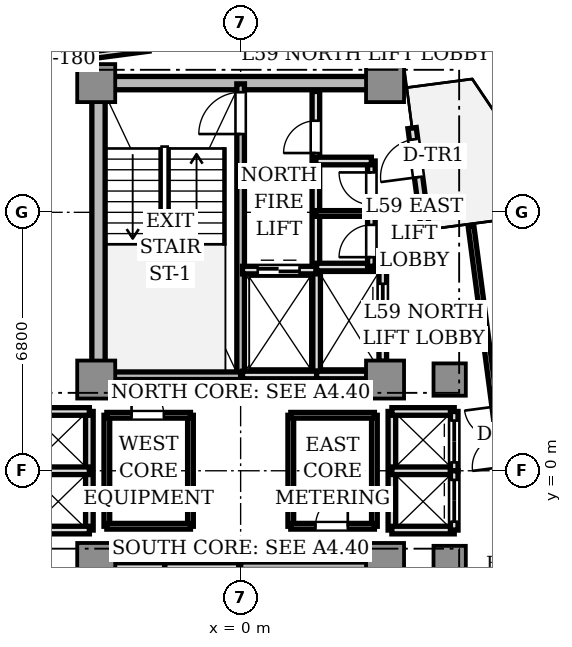
"""IFC4 building model, lengths in metres.
Left out: names, types, materials, properties, quantities, classifications, styles, units other than length and angle.
Written with IfcOpenShell. Run it as: python <this file> out.ifc"""

import sys

from ifc_helpers import new_model, si_unit, direction, frame, frame_2d, origin, origin_2d, place, context, subcontext, project, spatial, rectangle, extrude, source, transform, mapped, element, fill, save


model = new_model("IFC4")
c1 = context("Model", 3, precision=1e-05, world=origin(), true_north=direction((0.0, 1.0)))
c2 = subcontext(c1, "Body", "Model", "MODEL_VIEW")
j1 = project(units=[si_unit("LENGTHUNIT", "METRE"), si_unit("PLANEANGLEUNIT", "RADIAN")], contexts=[c1])
p1 = place(None, origin())
s1 = spatial("IfcSite", under=j1, at=p1, CompositionType="ELEMENT")
p2 = place(p1, origin())
s2 = spatial("IfcBuilding", under=s1, at=p2, CompositionType="ELEMENT")
p3 = place(p2, frame((0.0, 0.0, 213.2)))
s3 = spatial("IfcBuildingStorey", under=s2, at=p3, CompositionType="ELEMENT", Elevation=213.2)
p4 = place(p3, frame((-3.55, 10.2, 0.0), z_axis=(0.0, 0.0, 1.0), x_axis=(1.0, 0.0, 0.0)))
e1 = element("IfcWall", 1, at=p4, inside=s3, PredefinedType="SHEAR", context=c2, shape_type="SweptSolid", body=[
    extrude(rectangle(XDim=7.1, YDim=0.35, at=frame_2d((3.55, 0.0))), origin(), (0.0, 0.0, 1.0), 3.11),
])
p5 = place(p3, frame((-3.74, 2.85, 0.0), z_axis=(0.0, 0.0, 1.0), x_axis=(0.0, 1.0, 0.0)))
e2 = element("IfcWall", 2, at=p5, inside=s3, PredefinedType="SHEAR", context=c2, shape_type="SweptSolid", body=[
    extrude(rectangle(XDim=6.9, YDim=0.35, at=frame_2d((3.45, 0.0))), origin(), (0.0, 0.0, 1.0), 3.11),
])
m1 = source(origin(), c2, "Body", "SweptSolid", [
    extrude(rectangle(XDim=1.0, YDim=1.0, at=origin_2d()), origin(), (0.0, 0.0, 1.0), 3.11),
])
for number, where, z_axis, x_axis in (
    (3, (-3.8, 2.4, 0.0), (0.0, 0.0, 1.0), (1.0, 0.0, 0.0)),
    (4, (3.8, 2.4, 0.0), (0.0, 0.0, 1.0), (1.0, 0.0, 0.0)),
    (5, (-3.8, 10.2, 0.0), (0.0, 0.0, 1.0), (1.0, 0.0, 0.0)),
    (6, (3.8, 10.2, 0.0), (0.0, 0.0, 1.0), (1.0, 0.0, 0.0)),
    (7, (-3.8, -2.4, 0.0), (0.0, 0.0, 1.0), (1.0, 0.0, 0.0)),
    (8, (3.8, -2.4, 0.0), (0.0, 0.0, 1.0), (1.0, 0.0, 0.0)),
):
    element("IfcColumn", number, at=place(p3, frame(where, z_axis=z_axis, x_axis=x_axis)), inside=s3, PredefinedType="COLUMN", context=c2, shape_type="MappedRepresentation", body=[
        mapped(m1, transform((0.0, 0.0, 0.0), scale=1.0)),
    ])
m2 = source(origin(), c2, "Body", "SweptSolid", [
    extrude(rectangle(XDim=0.85, YDim=0.85, at=origin_2d()), origin(), (0.0, 0.0, 1.0), 3.11),
])
for number, where, z_axis, x_axis in (
    (9, (5.5, 2.4, 0.0), (0.0, 0.0, 1.0), (1.0, 0.0, 0.0)),
    (10, (5.5, -2.4, 0.0), (0.0, 0.0, 1.0), (1.0, 0.0, 0.0)),
):
    element("IfcColumn", number, at=place(p3, frame(where, z_axis=z_axis, x_axis=x_axis)), inside=s3, PredefinedType="COLUMN", context=c2, shape_type="MappedRepresentation", body=[
        mapped(m2, transform((0.0, 0.0, 0.0), scale=1.0)),
    ])
p6 = place(p3, frame((4.864, 6.339, 0.0), z_axis=(0.0, 0.0, 1.0), x_axis=(-0.130564442062, 0.991439824936, 0.0)))
e11 = element("IfcWall", 11, at=p6, inside=s3, PredefinedType="STANDARD", context=c2, shape_type="SweptSolid", body=[
    extrude(rectangle(XDim=2.7, YDim=0.22, at=frame_2d((1.35, 0.0))), origin(), (0.0, 0.0, 1.0), 3.11),
])
p7 = place(p6, frame((1.4, 0.0, 0.0)))
e12 = element("IfcOpeningElement", 12, at=p7, cuts=e11, PredefinedType="OPENING", context=c2, shape_type="SweptSolid", body=[
    extrude(rectangle(XDim=1.0, YDim=2.2, at=frame_2d((0.5, 1.1))), frame((0.0, 0.12, 0.0), z_axis=(0.0, -1.0, 0.0), x_axis=(1.0, 0.0, 0.0)), (0.0, 0.0, 1.0), 0.24),
])
p8 = place(p3, frame((0.0, 2.5, 0.0), z_axis=(0.0, 0.0, 1.0), x_axis=(0.0, 1.0, 0.0)))
e13 = element("IfcWall", 13, at=p8, inside=s3, PredefinedType="SOLIDWALL", context=c2, shape_type="SweptSolid", body=[
    extrude(rectangle(XDim=7.68, YDim=0.2, at=frame_2d((3.84, 0.0))), origin(), (0.0, 0.0, 1.0), 3.11),
])
p9 = place(p8, frame((6.36, 0.0, 0.0)))
e14 = element("IfcOpeningElement", 14, at=p9, cuts=e13, PredefinedType="OPENING", context=c2, shape_type="SweptSolid", body=[
    extrude(rectangle(XDim=1.1, YDim=2.15, at=frame_2d((0.55, 1.075))), frame((0.0, 0.11, 0.0), z_axis=(0.0, -1.0, 0.0), x_axis=(1.0, 0.0, 0.0)), (0.0, 0.0, 1.0), 0.22),
])
p10 = place(p3, frame((-3.72, 2.5, 0.0), z_axis=(0.0, 0.0, 1.0), x_axis=(1.0, 0.0, 0.0)))
e15 = element("IfcWall", 15, at=p10, inside=s3, PredefinedType="SOLIDWALL", context=c2, shape_type="SweptSolid", body=[
    extrude(rectangle(XDim=3.72, YDim=0.2, at=frame_2d((1.86, 0.0))), origin(), (0.0, 0.0, 1.0), 3.11),
])
p11 = place(p3, frame((0.0, -10.18, 0.0), z_axis=(0.0, 0.0, 1.0), x_axis=(0.0, 1.0, 0.0)))
e16 = element("IfcWall", 16, at=p11, inside=s3, PredefinedType="SOLIDWALL", context=c2, shape_type="SweptSolid", body=[
    extrude(rectangle(XDim=7.68, YDim=0.2, at=frame_2d((3.84, 0.0))), origin(), (0.0, 0.0, 1.0), 3.11),
])
p12 = place(p11, frame((0.28, 0.0, 0.0)))
e17 = element("IfcOpeningElement", 17, at=p12, cuts=e16, PredefinedType="OPENING", context=c2, shape_type="SweptSolid", body=[
    extrude(rectangle(XDim=1.1, YDim=2.15, at=frame_2d((0.55, 1.075))), frame((0.0, 0.11, 0.0), z_axis=(0.0, -1.0, 0.0), x_axis=(1.0, 0.0, 0.0)), (0.0, 0.0, 1.0), 0.22),
])
p13 = place(p3, frame((0.0, -2.5, 0.0), z_axis=(0.0, 0.0, 1.0), x_axis=(1.0, 0.0, 0.0)))
e18 = element("IfcWall", 18, at=p13, inside=s3, PredefinedType="SOLIDWALL", context=c2, shape_type="SweptSolid", body=[
    extrude(rectangle(XDim=3.72, YDim=0.2, at=frame_2d((1.86, 0.0))), origin(), (0.0, 0.0, 1.0), 3.11),
])
p14 = place(p3, frame((1.98, 5.32, 0.0), z_axis=(0.0, 0.0, 1.0), x_axis=(0.0, 1.0, 0.0)))
e19 = element("IfcWall", 19, at=p14, inside=s3, PredefinedType="SOLIDWALL", context=c2, shape_type="SweptSolid", body=[
    extrude(rectangle(XDim=4.66, YDim=0.2, at=frame_2d((2.33, 0.0))), origin(), (0.0, 0.0, 1.0), 2.66),
])
p15 = place(p14, frame((3.04, 0.0, 0.0)))
e20 = element("IfcOpeningElement", 20, at=p15, cuts=e19, PredefinedType="OPENING", context=c2, shape_type="SweptSolid", body=[
    extrude(rectangle(XDim=0.85, YDim=2.1, at=frame_2d((0.425, 1.05))), frame((0.0, 0.11, 0.0), z_axis=(0.0, -1.0, 0.0), x_axis=(1.0, 0.0, 0.0)), (0.0, 0.0, 1.0), 0.22),
])
p16 = place(p3, frame((2.0, 2.5, 0.0), z_axis=(0.0, 0.0, 1.0), x_axis=(0.0, 1.0, 0.0)))
e21 = element("IfcWall", 21, at=p16, inside=s3, PredefinedType="SOLIDWALL", context=c2, shape_type="SweptSolid", body=[
    extrude(rectangle(XDim=2.78, YDim=0.2, at=frame_2d((1.39, 0.0))), origin(), (0.0, 0.0, 1.0), 2.66),
])
p17 = place(p3, frame((0.05, 2.52, 0.0), z_axis=(0.0, 0.0, 1.0), x_axis=(1.0, 0.0, 0.0)))
e22 = element("IfcWall", 22, at=p17, inside=s3, PredefinedType="SOLIDWALL", context=c2, shape_type="SweptSolid", body=[
    extrude(rectangle(XDim=1.95, YDim=0.2, at=frame_2d((0.975, 0.0))), origin(), (0.0, 0.0, 1.0), 2.66),
])
p18 = place(p3, frame((0.05, 5.28, 0.0), z_axis=(0.0, 0.0, 1.0), x_axis=(1.0, 0.0, 0.0)))
e23 = element("IfcWall", 23, at=p18, inside=s3, PredefinedType="SOLIDWALL", context=c2, shape_type="SweptSolid", body=[
    extrude(rectangle(XDim=1.93, YDim=0.2, at=frame_2d((0.965, 0.0))), origin(), (0.0, 0.0, 1.0), 2.66),
])
p19 = place(p18, frame((0.4, 0.0, 0.0)))
e24 = element("IfcOpeningElement", 24, at=p19, cuts=e23, PredefinedType="OPENING", context=c2, shape_type="SweptSolid", body=[
    extrude(rectangle(XDim=1.1, YDim=2.2, at=frame_2d((0.55, 1.1))), frame((0.0, 0.11, 0.0), z_axis=(0.0, -1.0, 0.0), x_axis=(1.0, 0.0, 0.0)), (0.0, 0.0, 1.0), 0.22),
])
p20 = place(p3, frame((-2.0, -5.28, 0.0), z_axis=(0.0, 0.0, 1.0), x_axis=(0.0, 1.0, 0.0)))
e25 = element("IfcWall", 25, at=p20, inside=s3, PredefinedType="SOLIDWALL", context=c2, shape_type="SweptSolid", body=[
    extrude(rectangle(XDim=2.78, YDim=0.2, at=frame_2d((1.39, 0.0))), origin(), (0.0, 0.0, 1.0), 2.66),
])
p21 = place(p3, frame((-2.0, -2.52, 0.0), z_axis=(0.0, 0.0, 1.0), x_axis=(1.0, 0.0, 0.0)))
e26 = element("IfcWall", 26, at=p21, inside=s3, PredefinedType="SOLIDWALL", context=c2, shape_type="SweptSolid", body=[
    extrude(rectangle(XDim=1.95, YDim=0.2, at=frame_2d((0.975, 0.0))), origin(), (0.0, 0.0, 1.0), 2.66),
])
p22 = place(p3, frame((2.0, 2.52, 0.0), z_axis=(0.0, 0.0, 1.0), x_axis=(1.0, 0.0, 0.0)))
e27 = element("IfcWall", 27, at=p22, inside=s3, PredefinedType="SOLIDWALL", context=c2, shape_type="SweptSolid", body=[
    extrude(rectangle(XDim=1.32, YDim=0.2, at=frame_2d((0.66, 0.0))), origin(), (0.0, 0.0, 1.0), 2.66),
])
p23 = place(p3, frame((2.0, 5.36, 0.0), z_axis=(0.0, 0.0, 1.0), x_axis=(1.0, 0.0, 0.0)))
e28 = element("IfcWall", 28, at=p23, inside=s3, PredefinedType="SOLIDWALL", context=c2, shape_type="SweptSolid", body=[
    extrude(rectangle(XDim=1.74, YDim=0.2, at=frame_2d((0.87, 0.0))), origin(), (0.0, 0.0, 1.0), 2.66),
])
p24 = place(p3, frame((3.74, 2.88, 0.0), z_axis=(0.0, 0.0, 1.0), x_axis=(0.0, 1.0, 0.0)))
e29 = element("IfcWall", 29, at=p24, inside=s3, PredefinedType="SOLIDWALL", context=c2, shape_type="SweptSolid", body=[
    extrude(rectangle(XDim=2.48, YDim=0.2, at=frame_2d((1.24, 0.0))), origin(), (0.0, 0.0, 1.0), 2.66),
])
p25 = place(p24, frame((0.84, 0.0, 0.0)))
e30 = element("IfcOpeningElement", 30, at=p25, cuts=e29, PredefinedType="OPENING", context=c2, shape_type="SweptSolid", body=[
    extrude(rectangle(XDim=1.2, YDim=2.2, at=frame_2d((0.6, 1.1))), frame((0.0, 0.11, 0.0), z_axis=(0.0, -1.0, 0.0), x_axis=(1.0, 0.0, 0.0)), (0.0, 0.0, 1.0), 0.22),
])
p26 = place(p3, frame((-3.32, -2.52, 0.0), z_axis=(0.0, 0.0, 1.0), x_axis=(1.0, 0.0, 0.0)))
e31 = element("IfcWall", 31, at=p26, inside=s3, PredefinedType="SOLIDWALL", context=c2, shape_type="SweptSolid", body=[
    extrude(rectangle(XDim=1.32, YDim=0.2, at=frame_2d((0.66, 0.0))), origin(), (0.0, 0.0, 1.0), 2.66),
])
p27 = place(p3, frame((3.98, -1.56, 0.0), z_axis=(0.0, 0.0, 1.0), x_axis=(0.0, 1.0, 0.0)))
e32 = element("IfcWall", 32, at=p27, inside=s3, PredefinedType="SOLIDWALL", context=c2, shape_type="SweptSolid", body=[
    extrude(rectangle(XDim=3.12, YDim=0.2, at=frame_2d((1.56, 0.0))), origin(), (0.0, 0.0, 1.0), 2.33),
])
for number, where, z_axis, x_axis in (
    (33, (3.98, 1.56, 0.0), (0.0, 0.0, 1.0), (1.0, 0.0, 0.0)),
    (34, (3.98, -1.56, 0.0), (0.0, 0.0, 1.0), (1.0, 0.0, 0.0)),
    (35, (3.98, 0.0, 0.0), (0.0, 0.0, 1.0), (1.0, 0.0, 0.0)),
):
    element("IfcWall", number, at=place(p3, frame(where, z_axis=z_axis, x_axis=x_axis)), inside=s3, PredefinedType="SOLIDWALL", context=c2, shape_type="SweptSolid", body=[
        extrude(rectangle(XDim=1.64, YDim=0.2, at=frame_2d((0.82, 0.0))), origin(), (0.0, 0.0, 1.0), 2.66),
    ])
p28 = place(p3, frame((5.62, 0.0, 0.0), z_axis=(0.0, 0.0, 1.0), x_axis=(0.0, 1.0, 0.0)))
e36 = element("IfcWall", 36, at=p28, inside=s3, PredefinedType="SOLIDWALL", context=c2, shape_type="SweptSolid", body=[
    extrude(rectangle(XDim=1.56, YDim=0.2, at=frame_2d((0.78, 0.0))), origin(), (0.0, 0.0, 1.0), 2.66),
])
p29 = place(p28, frame((0.22, 0.0, 0.0)))
e37 = element("IfcOpeningElement", 37, at=p29, cuts=e36, PredefinedType="OPENING", context=c2, shape_type="SweptSolid", body=[
    extrude(rectangle(XDim=1.1, YDim=2.2, at=frame_2d((0.55, 1.1))), frame((0.0, 0.11, 0.0), z_axis=(0.0, -1.0, 0.0), x_axis=(1.0, 0.0, 0.0)), (0.0, 0.0, 1.0), 0.22),
])
p30 = place(p3, frame((5.62, -1.56, 0.0), z_axis=(0.0, 0.0, 1.0), x_axis=(0.0, 1.0, 0.0)))
e38 = element("IfcWall", 38, at=p30, inside=s3, PredefinedType="SOLIDWALL", context=c2, shape_type="SweptSolid", body=[
    extrude(rectangle(XDim=1.56, YDim=0.2, at=frame_2d((0.78, 0.0))), origin(), (0.0, 0.0, 1.0), 2.66),
])
p31 = place(p30, frame((0.22, 0.0, 0.0)))
e39 = element("IfcOpeningElement", 39, at=p31, cuts=e38, PredefinedType="OPENING", context=c2, shape_type="SweptSolid", body=[
    extrude(rectangle(XDim=1.1, YDim=2.2, at=frame_2d((0.55, 1.1))), frame((0.0, 0.11, 0.0), z_axis=(0.0, -1.0, 0.0), x_axis=(1.0, 0.0, 0.0)), (0.0, 0.0, 1.0), 0.22),
])
p32 = place(p3, frame((-3.98, -1.56, 0.0), z_axis=(0.0, 0.0, 1.0), x_axis=(0.0, 1.0, 0.0)))
e40 = element("IfcWall", 40, at=p32, inside=s3, PredefinedType="SOLIDWALL", context=c2, shape_type="SweptSolid", body=[
    extrude(rectangle(XDim=3.12, YDim=0.2, at=frame_2d((1.56, 0.0))), origin(), (0.0, 0.0, 1.0), 2.33),
])
for number, where, z_axis, x_axis in (
    (41, (-5.62, 1.56, 0.0), (0.0, 0.0, 1.0), (1.0, 0.0, 0.0)),
    (42, (-5.62, -1.56, 0.0), (0.0, 0.0, 1.0), (1.0, 0.0, 0.0)),
    (43, (-5.62, 0.0, 0.0), (0.0, 0.0, 1.0), (1.0, 0.0, 0.0)),
):
    element("IfcWall", number, at=place(p3, frame(where, z_axis=z_axis, x_axis=x_axis)), inside=s3, PredefinedType="SOLIDWALL", context=c2, shape_type="SweptSolid", body=[
        extrude(rectangle(XDim=1.64, YDim=0.2, at=frame_2d((0.82, 0.0))), origin(), (0.0, 0.0, 1.0), 2.66),
    ])
p33 = place(p3, frame((3.44, 5.38, 0.0), z_axis=(0.0, 0.0, 1.0), x_axis=(0.0, 1.0, 0.0)))
e44 = element("IfcWall", 44, at=p33, inside=s3, PredefinedType="SOLIDWALL", context=c2, shape_type="SweptSolid", body=[
    extrude(rectangle(XDim=2.77, YDim=0.2, at=frame_2d((1.385, 0.0))), origin(), (0.0, 0.0, 1.0), 2.66),
])
p34 = place(p33, frame((0.24, 0.0, 0.0)))
e45 = element("IfcOpeningElement", 45, at=p34, cuts=e44, PredefinedType="OPENING", context=c2, shape_type="SweptSolid", body=[
    extrude(rectangle(XDim=0.85, YDim=2.1, at=frame_2d((0.425, 1.05))), frame((0.0, 0.11, 0.0), z_axis=(0.0, -1.0, 0.0), x_axis=(1.0, 0.0, 0.0)), (0.0, 0.0, 1.0), 0.22),
])
p35 = place(p33, frame((1.62, 0.0, 0.0)))
e46 = element("IfcOpeningElement", 46, at=p35, cuts=e44, PredefinedType="OPENING", context=c2, shape_type="SweptSolid", body=[
    extrude(rectangle(XDim=0.85, YDim=2.1, at=frame_2d((0.425, 1.05))), frame((0.0, 0.11, 0.0), z_axis=(0.0, -1.0, 0.0), x_axis=(1.0, 0.0, 0.0)), (0.0, 0.0, 1.0), 0.22),
])
p36 = place(p3, frame((1.98, 8.15, 0.0), z_axis=(0.0, 0.0, 1.0), x_axis=(1.0, 0.0, 0.0)))
e47 = element("IfcWall", 47, at=p36, inside=s3, PredefinedType="SOLIDWALL", context=c2, shape_type="SweptSolid", body=[
    extrude(rectangle(XDim=1.46, YDim=0.2, at=frame_2d((0.73, 0.0))), origin(), (0.0, 0.0, 1.0), 2.66),
])
p37 = place(p3, frame((1.98, 6.77, 0.0), z_axis=(0.0, 0.0, 1.0), x_axis=(1.0, 0.0, 0.0)))
e48 = element("IfcWall", 48, at=p37, inside=s3, PredefinedType="PARTITIONING", context=c2, shape_type="SweptSolid", body=[
    extrude(rectangle(XDim=1.46, YDim=0.15, at=frame_2d((0.73, 0.0))), origin(), (0.0, 0.0, 1.0), 2.66),
])
p38 = place(p3, frame((-1.32, -1.46, 0.0), z_axis=(0.0, 0.0, 1.0), x_axis=(0.0, 1.0, 0.0)))
e49 = element("IfcWall", 49, at=p38, inside=s3, PredefinedType="PARTITIONING", context=c2, shape_type="SweptSolid", body=[
    extrude(rectangle(XDim=2.92, YDim=0.15, at=frame_2d((1.46, 0.0))), origin(), (0.0, 0.0, 1.0), 2.66),
])
p39 = place(p3, frame((-3.52, -1.46, 0.0), z_axis=(0.0, 0.0, 1.0), x_axis=(0.0, 1.0, 0.0)))
e50 = element("IfcWall", 50, at=p39, inside=s3, PredefinedType="PARTITIONING", context=c2, shape_type="SweptSolid", body=[
    extrude(rectangle(XDim=2.92, YDim=0.15, at=frame_2d((1.46, 0.0))), origin(), (0.0, 0.0, 1.0), 2.33),
])
p40 = place(p3, frame((-3.52, 1.46, 0.0), z_axis=(0.0, 0.0, 1.0), x_axis=(1.0, 0.0, 0.0)))
e51 = element("IfcWall", 51, at=p40, inside=s3, PredefinedType="PARTITIONING", context=c2, shape_type="SweptSolid", body=[
    extrude(rectangle(XDim=2.2, YDim=0.15, at=frame_2d((1.1, 0.0))), origin(), (0.0, 0.0, 1.0), 2.66),
])
p41 = place(p40, frame((0.65, 0.0, 0.0)))
e52 = element("IfcOpeningElement", 52, at=p41, cuts=e51, PredefinedType="OPENING", context=c2, shape_type="SweptSolid", body=[
    extrude(rectangle(XDim=0.85, YDim=2.1, at=frame_2d((0.425, 1.05))), frame((0.0, 0.085, 0.0), z_axis=(0.0, -1.0, 0.0), x_axis=(1.0, 0.0, 0.0)), (0.0, 0.0, 1.0), 0.17),
])
p42 = place(p3, frame((-3.52, -1.46, 0.0), z_axis=(0.0, 0.0, 1.0), x_axis=(1.0, 0.0, 0.0)))
e53 = element("IfcWall", 53, at=p42, inside=s3, PredefinedType="PARTITIONING", context=c2, shape_type="SweptSolid", body=[
    extrude(rectangle(XDim=2.2, YDim=0.15, at=frame_2d((1.1, 0.0))), origin(), (0.0, 0.0, 1.0), 2.66),
])
p43 = place(p3, frame((1.32, -1.46, 0.0), z_axis=(0.0, 0.0, 1.0), x_axis=(0.0, 1.0, 0.0)))
e54 = element("IfcWall", 54, at=p43, inside=s3, PredefinedType="PARTITIONING", context=c2, shape_type="SweptSolid", body=[
    extrude(rectangle(XDim=2.92, YDim=0.15, at=frame_2d((1.46, 0.0))), origin(), (0.0, 0.0, 1.0), 2.66),
])
p44 = place(p3, frame((3.52, -1.46, 0.0), z_axis=(0.0, 0.0, 1.0), x_axis=(0.0, 1.0, 0.0)))
e55 = element("IfcWall", 55, at=p44, inside=s3, PredefinedType="PARTITIONING", context=c2, shape_type="SweptSolid", body=[
    extrude(rectangle(XDim=2.92, YDim=0.15, at=frame_2d((1.46, 0.0))), origin(), (0.0, 0.0, 1.0), 2.33),
])
p45 = place(p3, frame((1.32, 1.46, 0.0), z_axis=(0.0, 0.0, 1.0), x_axis=(1.0, 0.0, 0.0)))
e56 = element("IfcWall", 56, at=p45, inside=s3, PredefinedType="PARTITIONING", context=c2, shape_type="SweptSolid", body=[
    extrude(rectangle(XDim=2.2, YDim=0.15, at=frame_2d((1.1, 0.0))), origin(), (0.0, 0.0, 1.0), 2.66),
])
p46 = place(p3, frame((1.32, -1.46, 0.0), z_axis=(0.0, 0.0, 1.0), x_axis=(1.0, 0.0, 0.0)))
e57 = element("IfcWall", 57, at=p46, inside=s3, PredefinedType="PARTITIONING", context=c2, shape_type="SweptSolid", body=[
    extrude(rectangle(XDim=2.2, YDim=0.15, at=frame_2d((1.1, 0.0))), origin(), (0.0, 0.0, 1.0), 2.66),
])
p47 = place(p46, frame((0.65, 0.0, 0.0)))
e58 = element("IfcOpeningElement", 58, at=p47, cuts=e57, PredefinedType="OPENING", context=c2, shape_type="SweptSolid", body=[
    extrude(rectangle(XDim=0.85, YDim=2.1, at=frame_2d((0.425, 1.05))), frame((0.0, 0.085, 0.0), z_axis=(0.0, -1.0, 0.0), x_axis=(1.0, 0.0, 0.0)), (0.0, 0.0, 1.0), 0.17),
])
p48 = place(p3, frame((7.522, -4.658, 0.0), z_axis=(0.0, 0.0, 1.0), x_axis=(-0.130505824974, 0.99144754256, 0.0)))
e59 = element("IfcWall", 59, at=p48, inside=s3, PredefinedType="PARTITIONING", context=c2, shape_type="SweptSolid", body=[
    extrude(rectangle(XDim=11.2, YDim=0.15, at=frame_2d((5.6, 0.0))), origin(), (0.0, 0.0, 1.0), 2.66),
])
p49 = place(p48, frame((4.8, 0.0, 0.0)))
e60 = element("IfcOpeningElement", 60, at=p49, cuts=e59, PredefinedType="OPENING", context=c2, shape_type="SweptSolid", body=[
    extrude(rectangle(XDim=1.6, YDim=2.25, at=frame_2d((0.8, 1.125))), frame((0.0, 0.085, 0.0), z_axis=(0.0, -1.0, 0.0), x_axis=(1.0, 0.0, 0.0)), (0.0, 0.0, 1.0), 0.17),
])
p50 = place(p3, frame((-2.423, 11.129, 0.0), z_axis=(0.0, 0.0, 1.0), x_axis=(-0.991445715827, -0.13051970184, 0.0)))
e61 = element("IfcWall", 61, at=p50, inside=s3, PredefinedType="PARTITIONING", context=c2, shape_type="SweptSolid", body=[
    extrude(rectangle(XDim=4.65, YDim=0.18, at=frame_2d((2.325, 0.0))), origin(), (0.0, 0.0, 1.0), 2.66),
])
m3 = source(origin(), c2, "Body", "SweptSolid", [
    extrude(rectangle(XDim=1.0, YDim=0.05, at=origin_2d()), origin(), (0.0, 0.0, 1.0), 2.2),
])
p51 = place(p7, frame((0.5, 0.0, 0.0)))
e62 = element("IfcDoor", 62, at=p51, inside=s3, OperationType="SINGLE_SWING_LEFT", PredefinedType="DOOR", context=c2, shape_type="MappedRepresentation", body=[
    mapped(m3, transform((0.0, 0.0, 0.0), scale=1.0)),
])
fill(e12, e62)
m4 = source(origin(), c2, "Body", "SweptSolid", [
    extrude(rectangle(XDim=1.1, YDim=0.05, at=origin_2d()), origin(), (0.0, 0.0, 1.0), 2.15),
])
p52 = place(p9, frame((0.55, 0.0, 0.0)))
e63 = element("IfcDoor", 63, at=p52, inside=s3, OperationType="SINGLE_SWING_LEFT", PredefinedType="DOOR", context=c2, shape_type="MappedRepresentation", body=[
    mapped(m4, transform((0.0, 0.0, 0.0), scale=1.0)),
])
fill(e14, e63)
m5 = source(origin(), c2, "Body", "SweptSolid", [
    extrude(rectangle(XDim=0.85, YDim=0.05, at=origin_2d()), origin(), (0.0, 0.0, 1.0), 2.1),
])
p53 = place(p15, frame((0.425, 0.0, 0.0)))
e64 = element("IfcDoor", 64, at=p53, inside=s3, OperationType="SINGLE_SWING_LEFT", PredefinedType="DOOR", context=c2, shape_type="MappedRepresentation", body=[
    mapped(m5, transform((0.0, 0.0, 0.0), scale=1.0)),
])
fill(e20, e64)
m6 = source(origin(), c2, "Body", "SweptSolid", [
    extrude(rectangle(XDim=1.1, YDim=0.05, at=origin_2d()), origin(), (0.0, 0.0, 1.0), 2.2),
])
p54 = place(p19, frame((0.55, 0.0, 0.0)))
e65 = element("IfcDoor", 65, at=p54, inside=s3, OperationType="DOUBLE_DOOR_SLIDING", PredefinedType="DOOR", context=c2, shape_type="MappedRepresentation", body=[
    mapped(m6, transform((0.0, 0.0, 0.0), scale=1.0)),
])
fill(e24, e65)
m7 = source(origin(), c2, "Body", "SweptSolid", [
    extrude(rectangle(XDim=1.2, YDim=0.05, at=origin_2d()), origin(), (0.0, 0.0, 1.0), 2.2),
])
p55 = place(p25, frame((0.6, 0.0, 0.0)))
e66 = element("IfcDoor", 66, at=p55, inside=s3, OperationType="DOUBLE_DOOR_SLIDING", PredefinedType="DOOR", context=c2, shape_type="MappedRepresentation", body=[
    mapped(m7, transform((0.0, 0.0, 0.0), scale=1.0)),
])
fill(e30, e66)
p56 = place(p29, frame((0.55, 0.0, 0.0)))
e67 = element("IfcDoor", 67, at=p56, inside=s3, OperationType="DOUBLE_DOOR_SLIDING", PredefinedType="DOOR", context=c2, shape_type="MappedRepresentation", body=[
    mapped(m6, transform((0.0, 0.0, 0.0), scale=1.0)),
])
fill(e37, e67)
p57 = place(p31, frame((0.55, 0.0, 0.0)))
e68 = element("IfcDoor", 68, at=p57, inside=s3, OperationType="DOUBLE_DOOR_SLIDING", PredefinedType="DOOR", context=c2, shape_type="MappedRepresentation", body=[
    mapped(m6, transform((0.0, 0.0, 0.0), scale=1.0)),
])
fill(e39, e68)
p58 = place(p34, frame((0.425, 0.0, 0.0)))
e69 = element("IfcDoor", 69, at=p58, inside=s3, OperationType="SINGLE_SWING_LEFT", PredefinedType="DOOR", context=c2, shape_type="MappedRepresentation", body=[
    mapped(m5, transform((0.0, 0.0, 0.0), scale=1.0)),
])
fill(e45, e69)
p59 = place(p35, frame((0.425, 0.0, 0.0)))
e70 = element("IfcDoor", 70, at=p59, inside=s3, OperationType="SINGLE_SWING_RIGHT", PredefinedType="DOOR", context=c2, shape_type="MappedRepresentation", body=[
    mapped(m5, transform((0.0, 0.0, 0.0), scale=1.0)),
])
fill(e46, e70)
p60 = place(p41, frame((0.425, 0.0, 0.0)))
e71 = element("IfcDoor", 71, at=p60, inside=s3, OperationType="SINGLE_SWING_LEFT", PredefinedType="DOOR", context=c2, shape_type="MappedRepresentation", body=[
    mapped(m5, transform((0.0, 0.0, 0.0), scale=1.0)),
])
fill(e52, e71)
p61 = place(p47, frame((0.425, 0.0, 0.0)))
e72 = element("IfcDoor", 72, at=p61, inside=s3, OperationType="SINGLE_SWING_RIGHT", PredefinedType="DOOR", context=c2, shape_type="MappedRepresentation", body=[
    mapped(m5, transform((0.0, 0.0, 0.0), scale=1.0)),
])
fill(e58, e72)
save(model, sys.argv[1])
